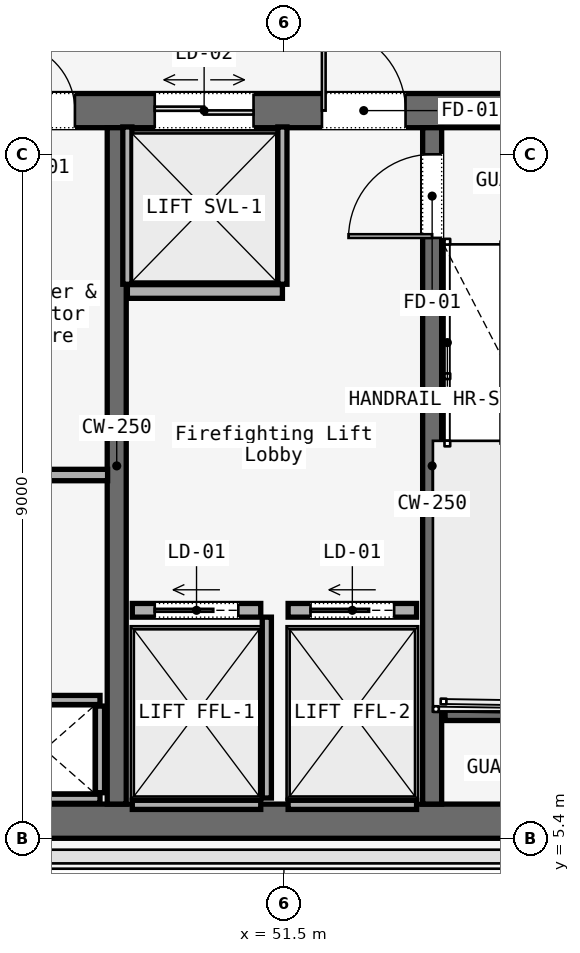
"""IFC4 building model, lengths in metres.
Left out: names, types, materials, properties, quantities, classifications, styles, units other than length and angle.
Written with IfcOpenShell. Run it as: python <this file> out.ifc"""

import sys

from ifc_helpers import new_model, si_unit, direction, frame, frame_2d, origin, place, context, subcontext, project, spatial, rectangle, extrude, element, fill, save


model = new_model("IFC4")
c1 = context("Model", 3, precision=1e-05, world=origin(), true_north=direction((0.0, 1.0)))
c2 = subcontext(c1, "Body", "Model", "MODEL_VIEW")
j1 = project(units=[si_unit("LENGTHUNIT", "METRE"), si_unit("PLANEANGLEUNIT", "RADIAN")], contexts=[c1])
p1 = place(None, origin())
s1 = spatial("IfcSite", under=j1, at=p1, CompositionType="ELEMENT")
p2 = place(p1, origin())
s2 = spatial("IfcBuilding", under=s1, at=p2, CompositionType="ELEMENT")
p3 = place(p2, frame((0.0, 0.0, 81.6)))
s3 = spatial("IfcBuildingStorey", under=s2, at=p3, CompositionType="ELEMENT", Elevation=81.6)
p4 = place(p3, frame((26.45, 14.975, 0.0), z_axis=(0.0, 0.0, 1.0), x_axis=(1.0, 0.0, 0.0)))
e1 = element("IfcWall", 1, at=p4, inside=s3, PredefinedType="SOLIDWALL", context=c2, shape_type="SweptSolid", body=[
    extrude(rectangle(XDim=31.1, YDim=0.45, at=frame_2d((15.55, 0.0))), origin(), (0.0, 0.0, 1.0), 3.58),
])
p5 = place(p4, frame((1.65, 0.0, 0.0)))
e2 = element("IfcOpeningElement", 2, at=p5, cuts=e1, PredefinedType="OPENING", context=c2, shape_type="SweptSolid", body=[
    extrude(rectangle(XDim=1.1, YDim=2.2, at=frame_2d((0.55, 1.1))), frame((0.0, 0.225, 0.0), z_axis=(0.0, -1.0, 0.0), x_axis=(1.0, 0.0, 0.0)), (0.0, 0.0, 1.0), 0.45),
])
p6 = place(p4, frame((13.65, 0.0, 0.0)))
e3 = element("IfcOpeningElement", 3, at=p6, cuts=e1, PredefinedType="OPENING", context=c2, shape_type="SweptSolid", body=[
    extrude(rectangle(XDim=1.1, YDim=2.2, at=frame_2d((0.55, 1.1))), frame((0.0, 0.225, 0.0), z_axis=(0.0, -1.0, 0.0), x_axis=(1.0, 0.0, 0.0)), (0.0, 0.0, 1.0), 0.45),
])
p7 = place(p4, frame((25.55, 0.0, 0.0)))
e4 = element("IfcOpeningElement", 4, at=p7, cuts=e1, PredefinedType="OPENING", context=c2, shape_type="SweptSolid", body=[
    extrude(rectangle(XDim=1.1, YDim=2.2, at=frame_2d((0.55, 1.1))), frame((0.0, 0.225, 0.0), z_axis=(0.0, -1.0, 0.0), x_axis=(1.0, 0.0, 0.0)), (0.0, 0.0, 1.0), 0.45),
])
p8 = place(p4, frame((10.7, 0.0, 0.0)))
e5 = element("IfcOpeningElement", 5, at=p8, cuts=e1, PredefinedType="OPENING", context=c2, shape_type="SweptSolid", body=[
    extrude(rectangle(XDim=1.4, YDim=2.2, at=frame_2d((0.7, 1.1))), frame((0.0, 0.225, 0.0), z_axis=(0.0, -1.0, 0.0), x_axis=(1.0, 0.0, 0.0)), (0.0, 0.0, 1.0), 0.45),
])
p9 = place(p4, frame((19.35, 0.0, 0.0)))
e6 = element("IfcOpeningElement", 6, at=p9, cuts=e1, PredefinedType="OPENING", context=c2, shape_type="SweptSolid", body=[
    extrude(rectangle(XDim=1.1, YDim=2.2, at=frame_2d((0.55, 1.1))), frame((0.0, 0.225, 0.0), z_axis=(0.0, -1.0, 0.0), x_axis=(1.0, 0.0, 0.0)), (0.0, 0.0, 1.0), 0.45),
])
p10 = place(p4, frame((21.4, 0.0, 0.0)))
e7 = element("IfcOpeningElement", 7, at=p10, cuts=e1, PredefinedType="OPENING", context=c2, shape_type="SweptSolid", body=[
    extrude(rectangle(XDim=0.9, YDim=2.1, at=frame_2d((0.45, 1.05))), frame((0.0, 0.225, 0.0), z_axis=(0.0, -1.0, 0.0), x_axis=(1.0, 0.0, 0.0)), (0.0, 0.0, 1.0), 0.45),
])
p11 = place(p4, frame((23.35, 0.0, 0.0)))
e8 = element("IfcOpeningElement", 8, at=p11, cuts=e1, PredefinedType="OPENING", context=c2, shape_type="SweptSolid", body=[
    extrude(rectangle(XDim=1.3, YDim=2.3, at=frame_2d((0.65, 1.15))), frame((0.0, 0.225, 0.0), z_axis=(0.0, -1.0, 0.0), x_axis=(1.0, 0.0, 0.0)), (0.0, 0.0, 1.0), 0.45),
])
p12 = place(p3, frame((26.45, 5.625, 0.0), z_axis=(0.0, 0.0, 1.0), x_axis=(1.0, 0.0, 0.0)))
e9 = element("IfcWall", 9, at=p12, inside=s3, PredefinedType="SOLIDWALL", context=c2, shape_type="SweptSolid", body=[
    extrude(rectangle(XDim=31.1, YDim=0.45, at=frame_2d((15.55, 0.0))), origin(), (0.0, 0.0, 1.0), 3.58),
])
p13 = place(p3, frame((49.3, 5.85, 0.0), z_axis=(0.0, 0.0, 1.0), x_axis=(0.0, 1.0, 0.0)))
e10 = element("IfcWall", 10, at=p13, inside=s3, PredefinedType="SOLIDWALL", context=c2, shape_type="SweptSolid", body=[
    extrude(rectangle(XDim=8.9, YDim=0.25, at=frame_2d((4.45, 0.0))), origin(), (0.0, 0.0, 1.0), 3.58),
])
p14 = place(p3, frame((53.45, 5.85, 0.0), z_axis=(0.0, 0.0, 1.0), x_axis=(0.0, 1.0, 0.0)))
e11 = element("IfcWall", 11, at=p14, inside=s3, PredefinedType="SOLIDWALL", context=c2, shape_type="SweptSolid", body=[
    extrude(rectangle(XDim=8.9, YDim=0.25, at=frame_2d((4.45, 0.0))), origin(), (0.0, 0.0, 1.0), 3.58),
])
p15 = place(p14, frame((7.45, 0.0, 0.0)))
e12 = element("IfcOpeningElement", 12, at=p15, cuts=e11, PredefinedType="OPENING", context=c2, shape_type="SweptSolid", body=[
    extrude(rectangle(XDim=1.1, YDim=2.2, at=frame_2d((0.55, 1.1))), frame((0.0, 0.125, 0.0), z_axis=(0.0, -1.0, 0.0), x_axis=(1.0, 0.0, 0.0)), (0.0, 0.0, 1.0), 0.25),
])
p16 = place(p3, frame((53.62, 7.05, 0.0), z_axis=(0.0, 0.0, 1.0), x_axis=(1.0, 0.0, 0.0)))
e13 = element("IfcWall", 13, at=p16, inside=s3, PredefinedType="SOLIDWALL", context=c2, shape_type="SweptSolid", body=[
    extrude(rectangle(XDim=3.115, YDim=0.2, at=frame_2d((1.558, 0.0))), origin(), (0.0, 0.0, 1.0), 3.8),
])
for number, where, z_axis, x_axis in (
    (14, (47.62, 5.92, 0.0), (0.0, 0.0, 1.0), (1.0, 0.0, 0.0)),
    (15, (47.62, 7.22, 0.0), (0.0, 0.0, 1.0), (1.0, 0.0, 0.0)),
):
    element("IfcWall", number, at=place(p3, frame(where, z_axis=z_axis, x_axis=x_axis)), inside=s3, PredefinedType="SOLIDWALL", context=c2, shape_type="SweptSolid", body=[
        extrude(rectangle(XDim=1.46, YDim=0.12, at=frame_2d((0.73, 0.0))), origin(), (0.0, 0.0, 1.0), 2.95),
    ])
p17 = place(p3, frame((49.08, 6.0, 0.0), z_axis=(0.0, 0.0, 1.0), x_axis=(0.0, 1.0, 0.0)))
e16 = element("IfcWall", 16, at=p17, inside=s3, PredefinedType="SOLIDWALL", context=c2, shape_type="SweptSolid", body=[
    extrude(rectangle(XDim=1.14, YDim=0.12, at=frame_2d((0.57, 0.0))), origin(), (0.0, 0.0, 1.0), 2.95),
])
p18 = place(p3, frame((47.45, 10.18, 0.0), z_axis=(0.0, 0.0, 1.0), x_axis=(1.0, 0.0, 0.0)))
e17 = element("IfcWall", 17, at=p18, inside=s3, PredefinedType="PARTITIONING", context=c2, shape_type="SweptSolid", body=[
    extrude(rectangle(XDim=1.73, YDim=0.15, at=frame_2d((0.865, 0.0))), origin(), (0.0, 0.0, 1.0), 2.95),
])
p19 = place(p3, frame((49.505, 8.4, 0.0), z_axis=(0.0, 0.0, 1.0), x_axis=(1.0, 0.0, 0.0)))
e18 = element("IfcWall", 18, at=p19, inside=s3, PredefinedType="SOLIDWALL", context=c2, shape_type="SweptSolid", body=[
    extrude(rectangle(XDim=1.69, YDim=0.18, at=frame_2d((0.845, 0.0))), origin(), (0.0, 0.0, 1.0), 2.95),
])
p20 = place(p19, frame((0.295, 0.0, 0.0)))
e19 = element("IfcOpeningElement", 19, at=p20, cuts=e18, PredefinedType="OPENING", context=c2, shape_type="SweptSolid", body=[
    extrude(rectangle(XDim=1.1, YDim=2.2, at=frame_2d((0.55, 1.1))), frame((0.0, 0.09, 0.0), z_axis=(0.0, -1.0, 0.0), x_axis=(1.0, 0.0, 0.0)), (0.0, 0.0, 1.0), 0.18),
])
p21 = place(p3, frame((49.505, 5.84, 0.0), z_axis=(0.0, 0.0, 1.0), x_axis=(1.0, 0.0, 0.0)))
e20 = element("IfcWall", 20, at=p21, inside=s3, PredefinedType="SOLIDWALL", context=c2, shape_type="SweptSolid", body=[
    extrude(rectangle(XDim=1.69, YDim=0.12, at=frame_2d((0.845, 0.0))), origin(), (0.0, 0.0, 1.0), 2.95),
])
p22 = place(p3, frame((51.275, 5.93, 0.0), z_axis=(0.0, 0.0, 1.0), x_axis=(0.0, 1.0, 0.0)))
e21 = element("IfcWall", 21, at=p22, inside=s3, PredefinedType="SOLIDWALL", context=c2, shape_type="SweptSolid", body=[
    extrude(rectangle(XDim=2.38, YDim=0.12, at=frame_2d((1.19, 0.0))), origin(), (0.0, 0.0, 1.0), 2.95),
])
p23 = place(p3, frame((51.555, 8.4, 0.0), z_axis=(0.0, 0.0, 1.0), x_axis=(1.0, 0.0, 0.0)))
e22 = element("IfcWall", 22, at=p23, inside=s3, PredefinedType="SOLIDWALL", context=c2, shape_type="SweptSolid", body=[
    extrude(rectangle(XDim=1.69, YDim=0.18, at=frame_2d((0.845, 0.0))), origin(), (0.0, 0.0, 1.0), 2.95),
])
p24 = place(p23, frame((0.295, 0.0, 0.0)))
e23 = element("IfcOpeningElement", 23, at=p24, cuts=e22, PredefinedType="OPENING", context=c2, shape_type="SweptSolid", body=[
    extrude(rectangle(XDim=1.1, YDim=2.2, at=frame_2d((0.55, 1.1))), frame((0.0, 0.09, 0.0), z_axis=(0.0, -1.0, 0.0), x_axis=(1.0, 0.0, 0.0)), (0.0, 0.0, 1.0), 0.18),
])
p25 = place(p3, frame((51.555, 5.84, 0.0), z_axis=(0.0, 0.0, 1.0), x_axis=(1.0, 0.0, 0.0)))
e24 = element("IfcWall", 24, at=p25, inside=s3, PredefinedType="SOLIDWALL", context=c2, shape_type="SweptSolid", body=[
    extrude(rectangle(XDim=1.69, YDim=0.12, at=frame_2d((0.845, 0.0))), origin(), (0.0, 0.0, 1.0), 2.95),
])
p26 = place(p3, frame((49.44, 12.595, 0.0), z_axis=(0.0, 0.0, 1.0), x_axis=(1.0, 0.0, 0.0)))
e25 = element("IfcWall", 25, at=p26, inside=s3, PredefinedType="SOLIDWALL", context=c2, shape_type="SweptSolid", body=[
    extrude(rectangle(XDim=2.04, YDim=0.18, at=frame_2d((1.02, 0.0))), origin(), (0.0, 0.0, 1.0), 2.95),
])
for number, where, z_axis, x_axis in (
    (26, (49.44, 12.69, 0.0), (0.0, 0.0, 1.0), (0.0, 1.0, 0.0)),
    (27, (51.48, 12.69, 0.0), (0.0, 0.0, 1.0), (0.0, 1.0, 0.0)),
):
    element("IfcWall", number, at=place(p3, frame(where, z_axis=z_axis, x_axis=x_axis)), inside=s3, PredefinedType="SOLIDWALL", context=c2, shape_type="SweptSolid", body=[
        extrude(rectangle(XDim=2.07, YDim=0.12, at=frame_2d((1.035, 0.0))), origin(), (0.0, 0.0, 1.0), 2.95),
    ])
p27 = place(p7, origin())
e28 = element("IfcDoor", 28, at=p27, inside=s3, OperationType="SINGLE_SWING_RIGHT", PredefinedType="DOOR", context=c2, shape_type="SweptSolid", body=[
    extrude(rectangle(XDim=1.1, YDim=2.2, at=frame_2d((0.55, 1.1))), frame((0.0, 0.025, 0.0), z_axis=(0.0, -1.0, 0.0), x_axis=(1.0, 0.0, 0.0)), (0.0, 0.0, 1.0), 0.05),
])
fill(e4, e28)
p28 = place(p10, origin())
e29 = element("IfcDoor", 29, at=p28, inside=s3, OperationType="SINGLE_SWING_LEFT", PredefinedType="DOOR", context=c2, shape_type="SweptSolid", body=[
    extrude(rectangle(XDim=0.9, YDim=2.1, at=frame_2d((0.45, 1.05))), frame((0.0, 0.025, 0.0), z_axis=(0.0, -1.0, 0.0), x_axis=(1.0, 0.0, 0.0)), (0.0, 0.0, 1.0), 0.05),
])
fill(e7, e29)
p29 = place(p15, origin())
e30 = element("IfcDoor", 30, at=p29, inside=s3, OperationType="SINGLE_SWING_LEFT", PredefinedType="DOOR", context=c2, shape_type="SweptSolid", body=[
    extrude(rectangle(XDim=1.1, YDim=2.2, at=frame_2d((0.55, 1.1))), frame((0.0, 0.025, 0.0), z_axis=(0.0, -1.0, 0.0), x_axis=(1.0, 0.0, 0.0)), (0.0, 0.0, 1.0), 0.05),
])
fill(e12, e30)
p30 = place(p20, origin())
e31 = element("IfcDoor", 31, at=p30, inside=s3, OperationType="SLIDING_TO_LEFT", PredefinedType="DOOR", context=c2, shape_type="SweptSolid", body=[
    extrude(rectangle(XDim=1.1, YDim=2.2, at=frame_2d((0.55, 1.1))), frame((0.0, 0.025, 0.0), z_axis=(0.0, -1.0, 0.0), x_axis=(1.0, 0.0, 0.0)), (0.0, 0.0, 1.0), 0.05),
])
fill(e19, e31)
p31 = place(p24, origin())
e32 = element("IfcDoor", 32, at=p31, inside=s3, OperationType="SLIDING_TO_LEFT", PredefinedType="DOOR", context=c2, shape_type="SweptSolid", body=[
    extrude(rectangle(XDim=1.1, YDim=2.2, at=frame_2d((0.55, 1.1))), frame((0.0, 0.025, 0.0), z_axis=(0.0, -1.0, 0.0), x_axis=(1.0, 0.0, 0.0)), (0.0, 0.0, 1.0), 0.05),
])
fill(e23, e32)
p32 = place(p11, origin())
e33 = element("IfcDoor", 33, at=p32, inside=s3, OperationType="DOUBLE_DOOR_SLIDING", PredefinedType="DOOR", context=c2, shape_type="SweptSolid", body=[
    extrude(rectangle(XDim=1.3, YDim=2.3, at=frame_2d((0.65, 1.15))), frame((0.0, 0.025, 0.0), z_axis=(0.0, -1.0, 0.0), x_axis=(1.0, 0.0, 0.0)), (0.0, 0.0, 1.0), 0.05),
])
fill(e8, e33)
save(model, sys.argv[1])
